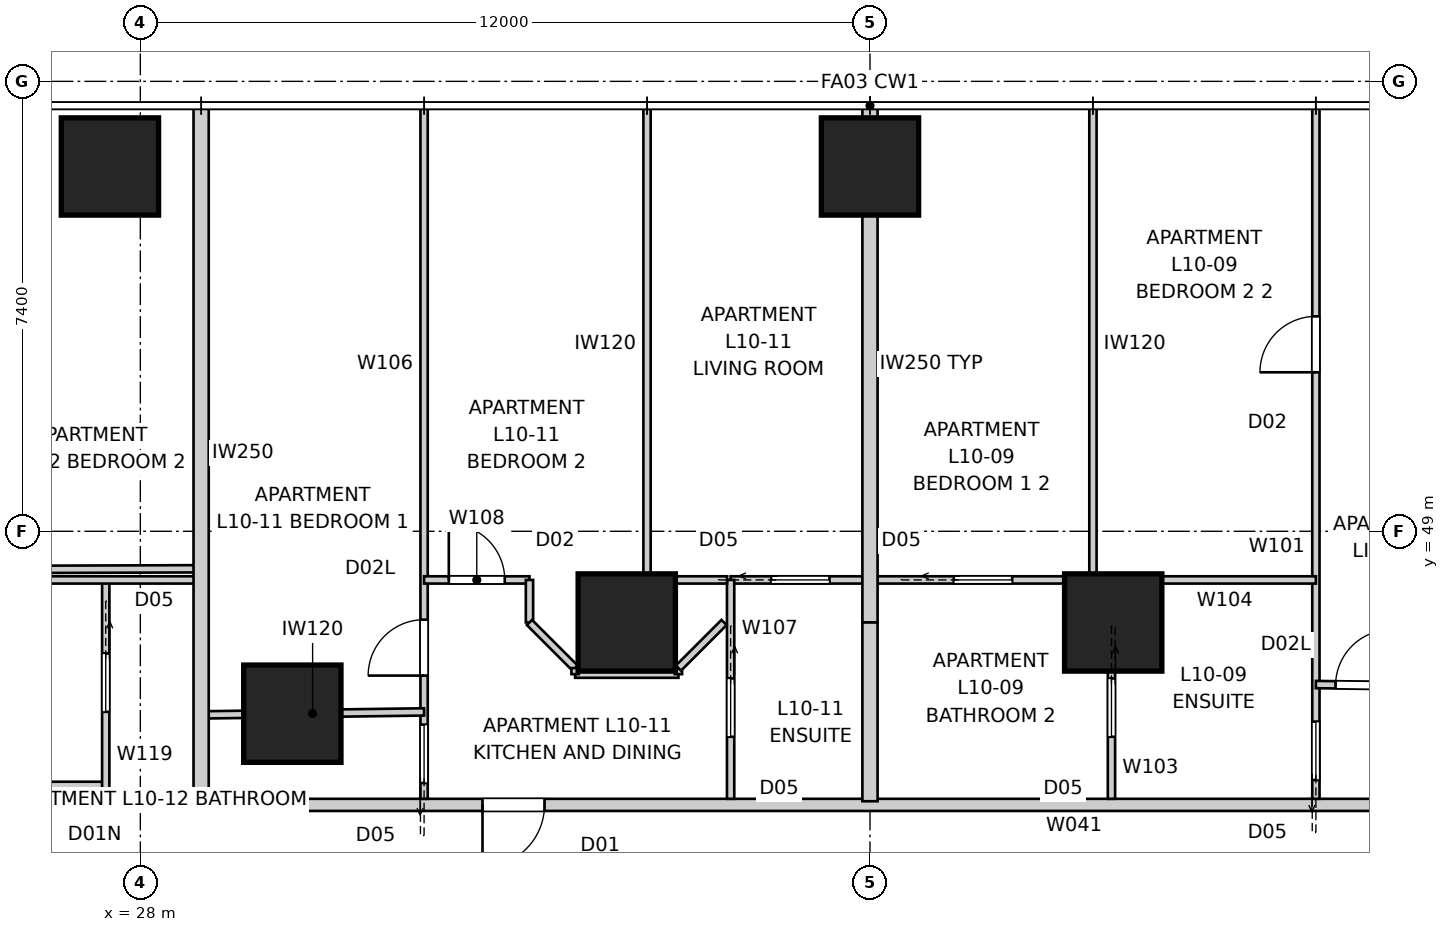
"""IFC4 building model, lengths in metres.
Left out: names, types, materials, properties, quantities, classifications, styles, units other than length and angle.
Written with IfcOpenShell. Run it as: python <this file> out.ifc"""

import sys

from ifc_helpers import new_model, si_unit, direction, frame, frame_2d, origin, origin_2d, place, context, subcontext, project, spatial, rectangle, extrude, element, fill, save


model = new_model("IFC4")
c1 = context("Model", 3, precision=1e-05, world=origin(), true_north=direction((0.0, 1.0)))
c2 = subcontext(c1, "Body", "Model", "MODEL_VIEW")
j1 = project(units=[si_unit("LENGTHUNIT", "METRE"), si_unit("PLANEANGLEUNIT", "RADIAN")], contexts=[c1])
p1 = place(None, origin())
s1 = spatial("IfcSite", under=j1, at=p1, CompositionType="ELEMENT")
p2 = place(p1, origin())
s2 = spatial("IfcBuilding", under=s1, at=p2, CompositionType="ELEMENT")
p3 = place(p2, frame((0.0, 0.0, 38.8)))
s3 = spatial("IfcBuildingStorey", under=s2, at=p3, CompositionType="ELEMENT", Elevation=38.8)
for number, where, z_axis, x_axis in (
    (1, (40.0, 55.0, 0.0), (0.0, 0.0, 1.0), (1.0, 0.0, 0.0)),
    (2, (27.5, 55.0, 0.0), (0.0, 0.0, 1.0), (1.0, 0.0, 0.0)),
):
    element("IfcColumn", number, at=place(p3, frame(where, z_axis=z_axis, x_axis=x_axis)), inside=s3, PredefinedType="COLUMN", context=c2, shape_type="SweptSolid", body=[
        extrude(rectangle(XDim=1.6, YDim=1.6, at=origin_2d()), origin(), (0.0, 0.0, 1.0), 3.2),
    ])
for number, where, z_axis, x_axis in (
    (3, (44.0, 47.5, 0.0), (0.0, 0.0, 1.0), (1.0, 0.0, 0.0)),
    (4, (36.0, 47.5, 0.0), (0.0, 0.0, 1.0), (1.0, 0.0, 0.0)),
    (5, (30.5, 46.0, 0.0), (0.0, 0.0, 1.0), (1.0, 0.0, 0.0)),
):
    element("IfcColumn", number, at=place(p3, frame(where, z_axis=z_axis, x_axis=x_axis)), inside=s3, PredefinedType="COLUMN", context=c2, shape_type="SweptSolid", body=[
        extrude(rectangle(XDim=1.6, YDim=1.6, at=origin_2d()), origin(), (0.0, 0.0, 1.0), 3.4),
    ])
p4 = place(p3, frame((54.5, 44.5, 0.0), z_axis=(0.0, 0.0, 1.0), x_axis=(-1.0, 0.0, 0.0)))
e6 = element("IfcWall", 6, at=p4, inside=s3, PredefinedType="PARTITIONING", context=c2, shape_type="SweptSolid", body=[
    extrude(rectangle(XDim=28.2, YDim=0.2, at=frame_2d((14.1, 0.0))), origin(), (0.0, 0.0, 1.0), 3.2),
])
p5 = place(p4, frame((19.853, 0.0, 0.0)))
e7 = element("IfcOpeningElement", 7, at=p5, cuts=e6, PredefinedType="OPENING", context=c2, shape_type="SweptSolid", body=[
    extrude(rectangle(XDim=1.02, YDim=2.34, at=frame_2d((0.51, 1.17))), frame((0.0, 0.11, 0.0), z_axis=(0.0, -1.0, 0.0), x_axis=(1.0, 0.0, 0.0)), (0.0, 0.0, 1.0), 0.22),
])
p6 = place(p4, frame((1.415, 0.0, 0.0)))
e8 = element("IfcOpeningElement", 8, at=p6, cuts=e6, PredefinedType="OPENING", context=c2, shape_type="SweptSolid", body=[
    extrude(rectangle(XDim=1.02, YDim=2.34, at=frame_2d((0.51, 1.17))), frame((0.0, 0.11, 0.0), z_axis=(0.0, -1.0, 0.0), x_axis=(1.0, 0.0, 0.0)), (0.0, 0.0, 1.0), 0.22),
])
p7 = place(p3, frame((29.0, 56.0, 0.0), z_axis=(0.0, 0.0, 1.0), x_axis=(0.0, -1.0, 0.0)))
e9 = element("IfcWall", 9, at=p7, inside=s3, PredefinedType="PARTITIONING", context=c2, shape_type="SweptSolid", body=[
    extrude(rectangle(XDim=11.44, YDim=0.25, at=frame_2d((5.72, 0.0))), origin(), (0.0, 0.0, 1.0), 3.2),
])
p8 = place(p3, frame((40.0, 56.0, 0.0), z_axis=(0.0, 0.0, 1.0), x_axis=(0.0, -1.0, 0.0)))
e10 = element("IfcWall", 10, at=p8, inside=s3, PredefinedType="PARTITIONING", context=c2, shape_type="SweptSolid", body=[
    extrude(rectangle(XDim=8.5, YDim=0.25, at=frame_2d((4.25, 0.0))), origin(), (0.0, 0.0, 1.0), 3.2),
])
p9 = place(p3, frame((40.0, 47.5, 0.0), z_axis=(0.0, 0.0, 1.0), x_axis=(0.0, -1.0, 0.0)))
e11 = element("IfcWall", 11, at=p9, inside=s3, PredefinedType="PARTITIONING", context=c2, shape_type="SweptSolid", body=[
    extrude(rectangle(XDim=2.94, YDim=0.25, at=frame_2d((1.47, 0.0))), origin(), (0.0, 0.0, 1.0), 2.671),
])
p10 = place(p3, frame((47.333, 44.6, 0.0), z_axis=(0.0, 0.0, 1.0), x_axis=(0.0, 1.0, 0.0)))
e12 = element("IfcWall", 12, at=p10, inside=s3, PredefinedType="PARTITIONING", context=c2, shape_type="SweptSolid", body=[
    extrude(rectangle(XDim=11.36, YDim=0.12, at=frame_2d((5.68, 0.0))), origin(), (0.0, 0.0, 1.0), 3.2),
])
p11 = place(p10, frame((7.015, 0.0, 0.0)))
e13 = element("IfcOpeningElement", 13, at=p11, cuts=e12, PredefinedType="OPENING", context=c2, shape_type="SweptSolid", body=[
    extrude(rectangle(XDim=0.92, YDim=2.34, at=frame_2d((0.46, 1.17))), frame((0.0, 0.07, 0.0), z_axis=(0.0, -1.0, 0.0), x_axis=(1.0, 0.0, 0.0)), (0.0, 0.0, 1.0), 0.14),
])
p12 = place(p10, frame((0.31, 0.0, 0.0)))
e14 = element("IfcOpeningElement", 14, at=p12, cuts=e12, PredefinedType="OPENING", context=c2, shape_type="SweptSolid", body=[
    extrude(rectangle(XDim=0.96, YDim=2.1, at=frame_2d((0.48, 1.05))), frame((0.0, 0.07, 0.0), z_axis=(0.0, -1.0, 0.0), x_axis=(1.0, 0.0, 0.0)), (0.0, 0.0, 1.0), 0.14),
])
p13 = place(p3, frame((47.333, 46.479, 0.0), z_axis=(0.0, 0.0, 1.0), x_axis=(0.999910459039, -0.013381849808, 0.0)))
e15 = element("IfcWall", 15, at=p13, inside=s3, PredefinedType="PARTITIONING", context=c2, shape_type="SweptSolid", body=[
    extrude(rectangle(XDim=3.667, YDim=0.12, at=frame_2d((1.833, 0.0))), origin(), (0.0, 0.0, 1.0), 2.2),
])
p14 = place(p13, frame((0.323, 0.0, 0.0)))
e16 = element("IfcOpeningElement", 16, at=p14, cuts=e15, PredefinedType="OPENING", context=c2, shape_type="SweptSolid", body=[
    extrude(rectangle(XDim=0.92, YDim=2.1, at=frame_2d((0.46, 1.05))), frame((0.0, 0.07, 0.0), z_axis=(0.0, -1.0, 0.0), x_axis=(1.0, 0.0, 0.0)), (0.0, 0.0, 1.0), 0.14),
])
p15 = place(p3, frame((43.971, 48.2, 0.0), z_axis=(0.0, 0.0, 1.0), x_axis=(0.0, -1.0, 0.0)))
e17 = element("IfcWall", 17, at=p15, inside=s3, PredefinedType="PARTITIONING", context=c2, shape_type="SweptSolid", body=[
    extrude(rectangle(XDim=3.6, YDim=0.12, at=frame_2d((1.8, 0.0))), origin(), (0.0, 0.0, 1.0), 3.2),
])
p16 = place(p15, frame((1.62, 0.0, 0.0)))
e18 = element("IfcOpeningElement", 18, at=p16, cuts=e17, PredefinedType="OPENING", context=c2, shape_type="SweptSolid", body=[
    extrude(rectangle(XDim=0.96, YDim=2.1, at=frame_2d((0.48, 1.05))), frame((0.0, 0.07, 0.0), z_axis=(0.0, -1.0, 0.0), x_axis=(1.0, 0.0, 0.0)), (0.0, 0.0, 1.0), 0.14),
])
p17 = place(p3, frame((37.708, 48.2, 0.0), z_axis=(0.0, 0.0, 1.0), x_axis=(1.0, 0.0, 0.0)))
e19 = element("IfcWall", 19, at=p17, inside=s3, PredefinedType="PARTITIONING", context=c2, shape_type="SweptSolid", body=[
    extrude(rectangle(XDim=9.625, YDim=0.12, at=frame_2d((4.812, 0.0))), origin(), (0.0, 0.0, 1.0), 3.2),
])
p18 = place(p17, frame((0.666, 0.0, 0.0)))
e20 = element("IfcOpeningElement", 20, at=p18, cuts=e19, PredefinedType="OPENING", context=c2, shape_type="SweptSolid", body=[
    extrude(rectangle(XDim=0.96, YDim=2.1, at=frame_2d((0.48, 1.05))), frame((0.0, 0.07, 0.0), z_axis=(0.0, -1.0, 0.0), x_axis=(1.0, 0.0, 0.0)), (0.0, 0.0, 1.0), 0.14),
])
p19 = place(p17, frame((3.67, 0.0, 0.0)))
e21 = element("IfcOpeningElement", 21, at=p19, cuts=e19, PredefinedType="OPENING", context=c2, shape_type="SweptSolid", body=[
    extrude(rectangle(XDim=0.96, YDim=2.1, at=frame_2d((0.48, 1.05))), frame((0.0, 0.07, 0.0), z_axis=(0.0, -1.0, 0.0), x_axis=(1.0, 0.0, 0.0)), (0.0, 0.0, 1.0), 0.14),
])
p20 = place(p3, frame((43.667, 55.96, 0.0), z_axis=(0.0, 0.0, 1.0), x_axis=(0.0, -1.0, 0.0)))
e22 = element("IfcWall", 22, at=p20, inside=s3, PredefinedType="PARTITIONING", context=c2, shape_type="SweptSolid", body=[
    extrude(rectangle(XDim=7.76, YDim=0.12, at=frame_2d((3.88, 0.0))), origin(), (0.0, 0.0, 1.0), 3.2),
])
p21 = place(p3, frame((32.667, 44.6, 0.0), z_axis=(0.0, 0.0, 1.0), x_axis=(0.0, 1.0, 0.0)))
e23 = element("IfcWall", 23, at=p21, inside=s3, PredefinedType="PARTITIONING", context=c2, shape_type="SweptSolid", body=[
    extrude(rectangle(XDim=11.36, YDim=0.12, at=frame_2d((5.68, 0.0))), origin(), (0.0, 0.0, 1.0), 3.2),
])
p22 = place(p21, frame((2.027, 0.0, 0.0)))
e24 = element("IfcOpeningElement", 24, at=p22, cuts=e23, PredefinedType="OPENING", context=c2, shape_type="SweptSolid", body=[
    extrude(rectangle(XDim=0.92, YDim=2.1, at=frame_2d((0.46, 1.05))), frame((0.0, 0.07, 0.0), z_axis=(0.0, -1.0, 0.0), x_axis=(1.0, 0.0, 0.0)), (0.0, 0.0, 1.0), 0.14),
])
p23 = place(p21, frame((0.26, 0.0, 0.0)))
e25 = element("IfcOpeningElement", 25, at=p23, cuts=e23, PredefinedType="OPENING", context=c2, shape_type="SweptSolid", body=[
    extrude(rectangle(XDim=0.96, YDim=2.1, at=frame_2d((0.48, 1.05))), frame((0.0, 0.07, 0.0), z_axis=(0.0, -1.0, 0.0), x_axis=(1.0, 0.0, 0.0)), (0.0, 0.0, 1.0), 0.14),
])
p24 = place(p3, frame((37.708, 48.2, 0.0), z_axis=(0.0, 0.0, 1.0), x_axis=(0.0, -1.0, 0.0)))
e26 = element("IfcWall", 26, at=p24, inside=s3, PredefinedType="PARTITIONING", context=c2, shape_type="SweptSolid", body=[
    extrude(rectangle(XDim=3.6, YDim=0.12, at=frame_2d((1.8, 0.0))), origin(), (0.0, 0.0, 1.0), 3.2),
])
p25 = place(p24, frame((1.62, 0.0, 0.0)))
e27 = element("IfcOpeningElement", 27, at=p25, cuts=e26, PredefinedType="OPENING", context=c2, shape_type="SweptSolid", body=[
    extrude(rectangle(XDim=0.96, YDim=2.1, at=frame_2d((0.48, 1.05))), frame((0.0, 0.07, 0.0), z_axis=(0.0, -1.0, 0.0), x_axis=(1.0, 0.0, 0.0)), (0.0, 0.0, 1.0), 0.14),
])
p26 = place(p3, frame((32.667, 48.2, 0.0), z_axis=(0.0, 0.0, 1.0), x_axis=(1.0, 0.0, 0.0)))
e28 = element("IfcWall", 28, at=p26, inside=s3, PredefinedType="PARTITIONING", context=c2, shape_type="SweptSolid", body=[
    extrude(rectangle(XDim=1.733, YDim=0.12, at=frame_2d((0.867, 0.0))), origin(), (0.0, 0.0, 1.0), 3.2),
])
p27 = place(p26, frame((0.407, 0.0, 0.0)))
e29 = element("IfcOpeningElement", 29, at=p27, cuts=e28, PredefinedType="OPENING", context=c2, shape_type="SweptSolid", body=[
    extrude(rectangle(XDim=0.92, YDim=2.34, at=frame_2d((0.46, 1.17))), frame((0.0, 0.07, 0.0), z_axis=(0.0, -1.0, 0.0), x_axis=(1.0, 0.0, 0.0)), (0.0, 0.0, 1.0), 0.14),
])
p28 = place(p3, frame((34.4, 48.2, 0.0), z_axis=(0.0, 0.0, 1.0), x_axis=(0.0, -1.0, 0.0)))
e30 = element("IfcWall", 30, at=p28, inside=s3, PredefinedType="PARTITIONING", context=c2, shape_type="SweptSolid", body=[
    extrude(rectangle(XDim=0.7, YDim=0.12, at=frame_2d((0.35, 0.0))), origin(), (0.0, 0.0, 1.0), 3.2),
])
p29 = place(p3, frame((34.4, 47.5, 0.0), z_axis=(0.0, 0.0, 1.0), x_axis=(0.707106781187, -0.707106781187, 0.0)))
e31 = element("IfcWall", 31, at=p29, inside=s3, PredefinedType="PARTITIONING", context=c2, shape_type="SweptSolid", body=[
    extrude(rectangle(XDim=1.061, YDim=0.12, at=frame_2d((0.53, 0.0))), origin(), (0.0, 0.0, 1.0), 3.2),
])
p30 = place(p3, frame((35.15, 46.65, 0.0), z_axis=(0.0, 0.0, 1.0), x_axis=(1.0, 0.0, 0.0)))
e32 = element("IfcWall", 32, at=p30, inside=s3, PredefinedType="PARTITIONING", context=c2, shape_type="SweptSolid", body=[
    extrude(rectangle(XDim=1.7, YDim=0.12, at=frame_2d((0.85, 0.0))), origin(), (0.0, 0.0, 1.0), 3.2),
])
p31 = place(p3, frame((36.85, 46.75, 0.0), z_axis=(0.0, 0.0, 1.0), x_axis=(0.707106781187, 0.707106781187, 0.0)))
e33 = element("IfcWall", 33, at=p31, inside=s3, PredefinedType="PARTITIONING", context=c2, shape_type="SweptSolid", body=[
    extrude(rectangle(XDim=1.061, YDim=0.12, at=frame_2d((0.53, 0.0))), origin(), (0.0, 0.0, 1.0), 3.2),
])
p32 = place(p3, frame((29.0, 45.98, 0.0), z_axis=(0.0, 0.0, 1.0), x_axis=(0.999909565989, 0.013448414164, 0.0)))
e34 = element("IfcWall", 34, at=p32, inside=s3, PredefinedType="PARTITIONING", context=c2, shape_type="SweptSolid", body=[
    extrude(rectangle(XDim=3.667, YDim=0.12, at=frame_2d((1.833, 0.0))), origin(), (0.0, 0.0, 1.0), 2.2),
])
p33 = place(p3, frame((37.65, 48.2, 0.0), z_axis=(0.0, 0.0, 1.0), x_axis=(-1.0, 0.0, 0.0)))
e35 = element("IfcWall", 35, at=p33, inside=s3, PredefinedType="PARTITIONING", context=c2, shape_type="SweptSolid", body=[
    extrude(rectangle(XDim=1.317, YDim=0.12, at=frame_2d((0.658, 0.0))), origin(), (0.0, 0.0, 1.0), 3.2),
])
p34 = place(p3, frame((36.333, 48.2, 0.0), z_axis=(0.0, 0.0, 1.0), x_axis=(0.0, 1.0, 0.0)))
e36 = element("IfcWall", 36, at=p34, inside=s3, PredefinedType="PARTITIONING", context=c2, shape_type="SweptSolid", body=[
    extrude(rectangle(XDim=7.76, YDim=0.12, at=frame_2d((3.88, 0.0))), origin(), (0.0, 0.0, 1.0), 3.2),
])
p35 = place(p3, frame((21.8, 44.821, 0.0), z_axis=(0.0, 0.0, 1.0), x_axis=(1.0, 0.0, 0.0)))
e37 = element("IfcWall", 37, at=p35, inside=s3, PredefinedType="PARTITIONING", context=c2, shape_type="SweptSolid", body=[
    extrude(rectangle(XDim=5.631, YDim=0.12, at=frame_2d((2.815, 0.0))), origin(), (0.0, 0.0, 1.0), 3.2),
])
p36 = place(p35, frame((2.355, 0.0, 0.0)))
e38 = element("IfcOpeningElement", 38, at=p36, cuts=e37, PredefinedType="OPENING", context=c2, shape_type="SweptSolid", body=[
    extrude(rectangle(XDim=0.92, YDim=2.0, at=frame_2d((0.46, 1.0))), frame((0.0, 0.07, 0.0), z_axis=(0.0, -1.0, 0.0), x_axis=(1.0, 0.0, 0.0)), (0.0, 0.0, 1.0), 0.14),
])
p37 = place(p3, frame((27.431, 48.2, 0.0), z_axis=(0.0, 0.0, 1.0), x_axis=(0.0, -1.0, 0.0)))
e39 = element("IfcWall", 39, at=p37, inside=s3, PredefinedType="PARTITIONING", context=c2, shape_type="SweptSolid", body=[
    extrude(rectangle(XDim=3.6, YDim=0.12, at=frame_2d((1.8, 0.0))), origin(), (0.0, 0.0, 1.0), 3.2),
])
p38 = place(p37, frame((1.209, 0.0, 0.0)))
e40 = element("IfcOpeningElement", 40, at=p38, cuts=e39, PredefinedType="OPENING", context=c2, shape_type="SweptSolid", body=[
    extrude(rectangle(XDim=0.96, YDim=2.1, at=frame_2d((0.48, 1.05))), frame((0.0, 0.07, 0.0), z_axis=(0.0, -1.0, 0.0), x_axis=(1.0, 0.0, 0.0)), (0.0, 0.0, 1.0), 0.14),
])
p39 = place(p3, frame((21.8, 48.2, 0.0), z_axis=(0.0, 0.0, 1.0), x_axis=(1.0, 0.0, 0.0)))
e41 = element("IfcWall", 41, at=p39, inside=s3, PredefinedType="PARTITIONING", context=c2, shape_type="SweptSolid", body=[
    extrude(rectangle(XDim=7.2, YDim=0.12, at=frame_2d((3.6, 0.0))), origin(), (0.0, 0.0, 1.0), 3.2),
])
p40 = place(p3, frame((14.04, 48.333, 0.0), z_axis=(0.0, 0.0, 1.0), x_axis=(0.9999944038, 0.003345499915, 0.0)))
e42 = element("IfcWall", 42, at=p40, inside=s3, PredefinedType="PARTITIONING", context=c2, shape_type="SweptSolid", body=[
    extrude(rectangle(XDim=14.96, YDim=0.12, at=frame_2d((7.48, 0.0))), origin(), (0.0, 0.0, 1.0), 3.2),
])
p41 = place(p40, frame((3.333, 0.0, 0.0)))
e43 = element("IfcOpeningElement", 43, at=p41, cuts=e42, PredefinedType="OPENING", context=c2, shape_type="SweptSolid", body=[
    extrude(rectangle(XDim=0.92, YDim=2.34, at=frame_2d((0.46, 1.17))), frame((0.0, 0.07, 0.0), z_axis=(0.0, -1.0, 0.0), x_axis=(1.0, 0.0, 0.0)), (0.0, 0.0, 1.0), 0.14),
])
for number, where, z_axis, x_axis in (
    (44, (35.15, 46.65, 0.0), (0.0, 0.0, 1.0), (0.0, 1.0, 0.0)),
    (45, (36.85, 46.65, 0.0), (0.0, 0.0, 1.0), (0.0, 1.0, 0.0)),
):
    element("IfcWall", number, at=place(p3, frame(where, z_axis=z_axis, x_axis=x_axis)), inside=s3, PredefinedType="PARTITIONING", context=c2, shape_type="SweptSolid", body=[
        extrude(rectangle(XDim=0.1, YDim=0.12, at=frame_2d((0.05, 0.0))), origin(), (0.0, 0.0, 1.0), 3.2),
    ])
p42 = place(p5, origin())
e46 = element("IfcDoor", 46, at=p42, inside=s3, OperationType="SINGLE_SWING_RIGHT", PredefinedType="DOOR", context=c2, shape_type="SweptSolid", body=[
    extrude(rectangle(XDim=1.02, YDim=2.34, at=frame_2d((0.51, 1.17))), frame((0.0, 0.025, 0.0), z_axis=(0.0, -1.0, 0.0), x_axis=(1.0, 0.0, 0.0)), (0.0, 0.0, 1.0), 0.05),
])
fill(e7, e46)
p43 = place(p25, origin())
e47 = element("IfcDoor", 47, at=p43, inside=s3, OperationType="SLIDING_TO_LEFT", PredefinedType="DOOR", context=c2, shape_type="SweptSolid", body=[
    extrude(rectangle(XDim=0.96, YDim=2.1, at=frame_2d((0.48, 1.05))), frame((0.0, 0.025, 0.0), z_axis=(0.0, -1.0, 0.0), x_axis=(1.0, 0.0, 0.0)), (0.0, 0.0, 1.0), 0.05),
])
fill(e27, e47)
p44 = place(p22, origin())
e48 = element("IfcDoor", 48, at=p44, inside=s3, OperationType="SINGLE_SWING_LEFT", PredefinedType="DOOR", context=c2, shape_type="SweptSolid", body=[
    extrude(rectangle(XDim=0.92, YDim=2.1, at=frame_2d((0.46, 1.05))), frame((0.0, 0.025, 0.0), z_axis=(0.0, -1.0, 0.0), x_axis=(1.0, 0.0, 0.0)), (0.0, 0.0, 1.0), 0.05),
])
fill(e24, e48)
p45 = place(p27, origin())
e49 = element("IfcDoor", 49, at=p45, inside=s3, OperationType="SINGLE_SWING_LEFT", PredefinedType="DOOR", context=c2, shape_type="SweptSolid", body=[
    extrude(rectangle(XDim=0.92, YDim=2.34, at=frame_2d((0.46, 1.17))), frame((0.0, 0.025, 0.0), z_axis=(0.0, -1.0, 0.0), x_axis=(1.0, 0.0, 0.0)), (0.0, 0.0, 1.0), 0.05),
])
fill(e29, e49)
p46 = place(p23, origin())
e50 = element("IfcDoor", 50, at=p46, inside=s3, OperationType="SLIDING_TO_LEFT", PredefinedType="DOOR", context=c2, shape_type="SweptSolid", body=[
    extrude(rectangle(XDim=0.96, YDim=2.1, at=frame_2d((0.48, 1.05))), frame((0.0, 0.025, 0.0), z_axis=(0.0, -1.0, 0.0), x_axis=(1.0, 0.0, 0.0)), (0.0, 0.0, 1.0), 0.05),
])
fill(e25, e50)
p47 = place(p18, origin())
e51 = element("IfcDoor", 51, at=p47, inside=s3, OperationType="SLIDING_TO_LEFT", PredefinedType="DOOR", context=c2, shape_type="SweptSolid", body=[
    extrude(rectangle(XDim=0.96, YDim=2.1, at=frame_2d((0.48, 1.05))), frame((0.0, 0.025, 0.0), z_axis=(0.0, -1.0, 0.0), x_axis=(1.0, 0.0, 0.0)), (0.0, 0.0, 1.0), 0.05),
])
fill(e20, e51)
p48 = place(p11, origin())
e52 = element("IfcDoor", 52, at=p48, inside=s3, OperationType="SINGLE_SWING_LEFT", PredefinedType="DOOR", context=c2, shape_type="SweptSolid", body=[
    extrude(rectangle(XDim=0.92, YDim=2.34, at=frame_2d((0.46, 1.17))), frame((0.0, 0.025, 0.0), z_axis=(0.0, -1.0, 0.0), x_axis=(1.0, 0.0, 0.0)), (0.0, 0.0, 1.0), 0.05),
])
fill(e13, e52)
p49 = place(p14, origin())
e53 = element("IfcDoor", 53, at=p49, inside=s3, OperationType="SINGLE_SWING_RIGHT", PredefinedType="DOOR", context=c2, shape_type="SweptSolid", body=[
    extrude(rectangle(XDim=0.92, YDim=2.1, at=frame_2d((0.46, 1.05))), frame((0.0, 0.025, 0.0), z_axis=(0.0, -1.0, 0.0), x_axis=(1.0, 0.0, 0.0)), (0.0, 0.0, 1.0), 0.05),
])
fill(e16, e53)
p50 = place(p38, origin())
e54 = element("IfcDoor", 54, at=p50, inside=s3, OperationType="SLIDING_TO_LEFT", PredefinedType="DOOR", context=c2, shape_type="SweptSolid", body=[
    extrude(rectangle(XDim=0.96, YDim=2.1, at=frame_2d((0.48, 1.05))), frame((0.0, 0.025, 0.0), z_axis=(0.0, -1.0, 0.0), x_axis=(1.0, 0.0, 0.0)), (0.0, 0.0, 1.0), 0.05),
])
fill(e40, e54)
p51 = place(p12, origin())
e55 = element("IfcDoor", 55, at=p51, inside=s3, OperationType="SLIDING_TO_LEFT", PredefinedType="DOOR", context=c2, shape_type="SweptSolid", body=[
    extrude(rectangle(XDim=0.96, YDim=2.1, at=frame_2d((0.48, 1.05))), frame((0.0, 0.025, 0.0), z_axis=(0.0, -1.0, 0.0), x_axis=(1.0, 0.0, 0.0)), (0.0, 0.0, 1.0), 0.05),
])
fill(e14, e55)
p52 = place(p16, origin())
e56 = element("IfcDoor", 56, at=p52, inside=s3, OperationType="SLIDING_TO_LEFT", PredefinedType="DOOR", context=c2, shape_type="SweptSolid", body=[
    extrude(rectangle(XDim=0.96, YDim=2.1, at=frame_2d((0.48, 1.05))), frame((0.0, 0.025, 0.0), z_axis=(0.0, -1.0, 0.0), x_axis=(1.0, 0.0, 0.0)), (0.0, 0.0, 1.0), 0.05),
])
fill(e18, e56)
p53 = place(p19, origin())
e57 = element("IfcDoor", 57, at=p53, inside=s3, OperationType="SLIDING_TO_LEFT", PredefinedType="DOOR", context=c2, shape_type="SweptSolid", body=[
    extrude(rectangle(XDim=0.96, YDim=2.1, at=frame_2d((0.48, 1.05))), frame((0.0, 0.025, 0.0), z_axis=(0.0, -1.0, 0.0), x_axis=(1.0, 0.0, 0.0)), (0.0, 0.0, 1.0), 0.05),
])
fill(e21, e57)
save(model, sys.argv[1])
